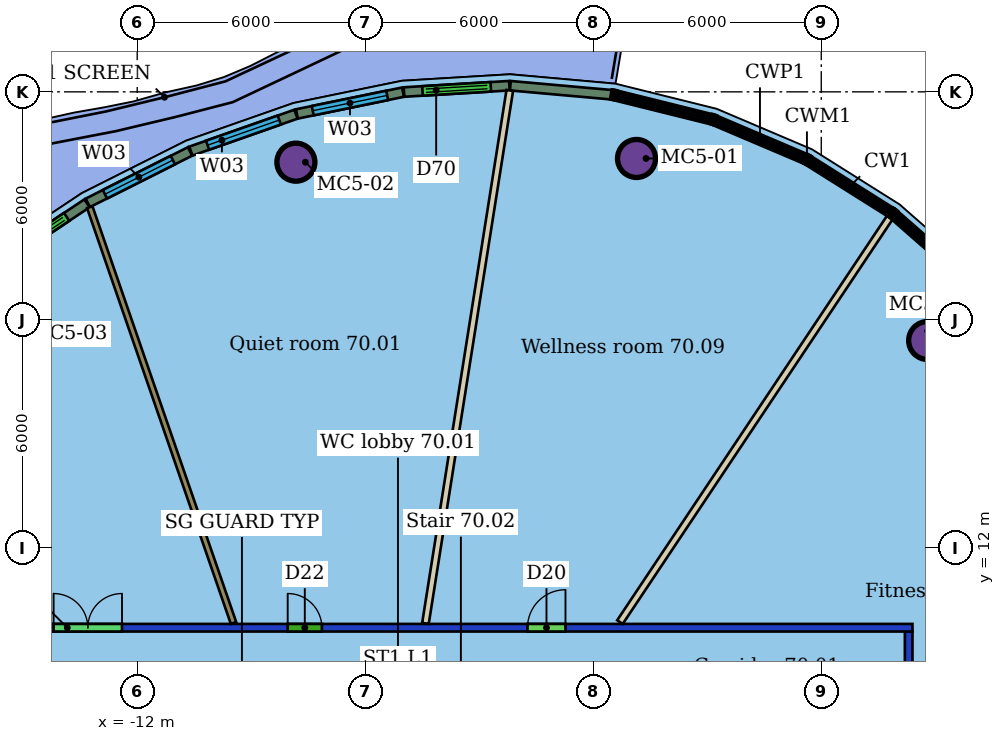
"""IFC4 building model, lengths in metres.
Left out: names, types, materials, properties, quantities, classifications, styles, units other than length and angle.
Written with IfcOpenShell. Run it as: python <this file> out.ifc"""

import sys

from ifc_helpers import new_model, si_unit, direction, frame, frame_2d, origin, origin_2d, place, context, subcontext, project, spatial, rectangle, hollow_circle, extrude, element, fill, save


model = new_model("IFC4")
c1 = context("Model", 3, precision=1e-05, world=origin(), true_north=direction((0.0, 1.0)))
c2 = subcontext(c1, "Body", "Model", "MODEL_VIEW")
j1 = project(units=[si_unit("LENGTHUNIT", "METRE"), si_unit("PLANEANGLEUNIT", "RADIAN")], contexts=[c1])
p1 = place(None, origin())
s1 = spatial("IfcSite", under=j1, at=p1, CompositionType="ELEMENT")
p2 = place(p1, origin())
s2 = spatial("IfcBuilding", under=s1, at=p2, CompositionType="ELEMENT")
p3 = place(p2, frame((0.0, 0.0, 282.9)))
s3 = spatial("IfcBuildingStorey", under=s2, at=p3, CompositionType="ELEMENT", Elevation=282.9)
for number, where, z_axis, x_axis in (
    (1, (1.138, 22.247, 0.0), (0.0, 0.0, 1.0), (1.0, 0.0, 0.0)),
    (2, (-7.825, 22.149, 0.0), (0.0, 0.0, 1.0), (1.0, 0.0, 0.0)),
    (3, (8.8, 17.457, 0.0), (0.0, 0.0, 1.0), (1.0, 0.0, 0.0)),
):
    element("IfcColumn", number, at=place(p3, frame(where, z_axis=z_axis, x_axis=x_axis)), inside=s3, PredefinedType="COLUMN", context=c2, shape_type="SweptSolid", body=[
        extrude(hollow_circle(Radius=0.5, WallThickness=0.04, at=origin_2d()), origin(), (0.0, 0.0, 1.0), 3.45),
    ])
p4 = place(p3, frame((-20.4, 9.9, 0.0), z_axis=(0.0, 0.0, 1.0), x_axis=(1.0, 0.0, 0.0)))
e4 = element("IfcWall", 4, at=p4, inside=s3, PredefinedType="PARTITIONING", context=c2, shape_type="SweptSolid", body=[
    extrude(rectangle(XDim=28.8, YDim=0.2, at=frame_2d((14.4, 0.0))), origin(), (0.0, 0.0, 1.0), 3.1),
])
p5 = place(p4, frame((12.36, 0.0, 0.0)))
e5 = element("IfcOpeningElement", 5, at=p5, cuts=e4, PredefinedType="OPENING", context=c2, shape_type="SweptSolid", body=[
    extrude(rectangle(XDim=0.9, YDim=2.1, at=frame_2d((0.45, 1.05))), frame((0.0, 0.11, 0.0), z_axis=(0.0, -1.0, 0.0), x_axis=(1.0, 0.0, 0.0)), (0.0, 0.0, 1.0), 0.22),
])
p6 = place(p4, frame((6.2, 0.0, 0.0)))
e6 = element("IfcOpeningElement", 6, at=p6, cuts=e4, PredefinedType="OPENING", context=c2, shape_type="SweptSolid", body=[
    extrude(rectangle(XDim=1.8, YDim=2.1, at=frame_2d((0.9, 1.05))), frame((0.0, 0.11, 0.0), z_axis=(0.0, -1.0, 0.0), x_axis=(1.0, 0.0, 0.0)), (0.0, 0.0, 1.0), 0.22),
])
p7 = place(p4, frame((18.669, 0.0, 0.0)))
e7 = element("IfcOpeningElement", 7, at=p7, cuts=e4, PredefinedType="OPENING", context=c2, shape_type="SweptSolid", body=[
    extrude(rectangle(XDim=1.0, YDim=2.1, at=frame_2d((0.5, 1.05))), frame((0.0, 0.11, 0.0), z_axis=(0.0, -1.0, 0.0), x_axis=(1.0, 0.0, 0.0)), (0.0, 0.0, 1.0), 0.22),
])
p8 = place(p3, frame((8.3, 9.8, 0.0), z_axis=(0.0, 0.0, 1.0), x_axis=(0.0, -1.0, 0.0)))
e8 = element("IfcWall", 8, at=p8, inside=s3, PredefinedType="PARTITIONING", context=c2, shape_type="SweptSolid", body=[
    extrude(rectangle(XDim=19.6, YDim=0.2, at=frame_2d((9.8, 0.0))), origin(), (0.0, 0.0, 1.0), 3.1),
])
p9 = place(p8, frame((14.189, 0.0, 0.0)))
e9 = element("IfcOpeningElement", 9, at=p9, cuts=e8, PredefinedType="OPENING", context=c2, shape_type="SweptSolid", body=[
    extrude(rectangle(XDim=1.5, YDim=2.1, at=frame_2d((0.75, 1.05))), frame((0.0, 0.11, 0.0), z_axis=(0.0, -1.0, 0.0), x_axis=(1.0, 0.0, 0.0)), (0.0, 0.0, 1.0), 0.22),
])
p10 = place(p8, frame((9.651, 0.0, 0.0)))
e10 = element("IfcOpeningElement", 10, at=p10, cuts=e8, PredefinedType="OPENING", context=c2, shape_type="SweptSolid", body=[
    extrude(rectangle(XDim=1.5, YDim=2.4, at=frame_2d((0.75, 1.2))), frame((0.0, 0.11, 0.0), z_axis=(0.0, -1.0, 0.0), x_axis=(1.0, 0.0, 0.0)), (0.0, 0.0, 1.0), 0.22),
])
p11 = place(p8, frame((4.201, 0.0, 0.0)))
e11 = element("IfcOpeningElement", 11, at=p11, cuts=e8, PredefinedType="OPENING", context=c2, shape_type="SweptSolid", body=[
    extrude(rectangle(XDim=1.5, YDim=2.1, at=frame_2d((0.75, 1.05))), frame((0.0, 0.11, 0.0), z_axis=(0.0, -1.0, 0.0), x_axis=(1.0, 0.0, 0.0)), (0.0, 0.0, 1.0), 0.22),
])
p12 = place(p3, frame((-2.196, 24.038, 0.0), z_axis=(0.0, 0.0, 1.0), x_axis=(-0.156301629097, -0.987709370585, 0.0)))
e12 = element("IfcWall", 12, at=p12, inside=s3, PredefinedType="PARTITIONING", context=c2, shape_type="SweptSolid", body=[
    extrude(rectangle(XDim=14.198, YDim=0.175, at=frame_2d((7.099, 0.0))), origin(), (0.0, 0.0, 1.0), 3.45),
])
p13 = place(p3, frame((-13.249, 20.965, 0.0), z_axis=(0.0, 0.0, 1.0), x_axis=(0.32678024546, -0.945100349792, 0.0)))
e13 = element("IfcWall", 13, at=p13, inside=s3, PredefinedType="PARTITIONING", context=c2, shape_type="SweptSolid", body=[
    extrude(rectangle(XDim=11.576, YDim=0.15, at=frame_2d((5.788, 0.0))), origin(), (0.0, 0.0, 1.0), 3.45),
])
p14 = place(p3, frame((7.807, 20.697, 0.0), z_axis=(0.0, 0.0, 1.0), x_axis=(-0.55495104707, -0.83188300581, 0.0)))
e14 = element("IfcWall", 14, at=p14, inside=s3, PredefinedType="PARTITIONING", context=c2, shape_type="SweptSolid", body=[
    extrude(rectangle(XDim=12.801, YDim=0.175, at=frame_2d((6.4, 0.0))), origin(), (0.0, 0.0, 1.0), 3.45),
])
p15 = place(p3, frame((0.482, 23.924, 0.0), z_axis=(0.0, 0.0, 1.0), x_axis=(-0.996046653752, 0.088831658488, 0.0)))
e15 = element("IfcWall", 15, at=p15, inside=s3, PredefinedType="SOLIDWALL", context=c2, shape_type="SweptSolid", body=[
    extrude(rectangle(XDim=2.674, YDim=0.25, at=frame_2d((1.337, 0.0))), origin(), (0.0, 0.0, 1.0), 3.15),
])
p16 = place(p3, frame((-2.208, 24.162, 0.0), z_axis=(0.0, 0.0, 1.0), x_axis=(-0.998195899902, -0.060041197678, 0.0)))
e16 = element("IfcWall", 16, at=p16, inside=s3, PredefinedType="SOLIDWALL", context=c2, shape_type="SweptSolid", body=[
    extrude(rectangle(XDim=2.777, YDim=0.25, at=frame_2d((1.389, 0.0))), origin(), (0.0, 0.0, 1.0), 3.15),
])
p17 = place(p16, frame((0.489, 0.0, 0.0)))
e17 = element("IfcOpeningElement", 17, at=p17, cuts=e16, PredefinedType="OPENING", context=c2, shape_type="SweptSolid", body=[
    extrude(rectangle(XDim=1.8, YDim=2.4, at=frame_2d((0.9, 1.2))), frame((0.0, 0.135, 0.0), z_axis=(0.0, -1.0, 0.0), x_axis=(1.0, 0.0, 0.0)), (0.0, 0.0, 1.0), 0.27),
])
p18 = place(p3, frame((-5.006, 23.992, 0.0), z_axis=(0.0, 0.0, 1.0), x_axis=(-0.979580220635, -0.201053702627, 0.0)))
e18 = element("IfcWall", 18, at=p18, inside=s3, PredefinedType="SOLIDWALL", context=c2, shape_type="SweptSolid", body=[
    extrude(rectangle(XDim=2.851, YDim=0.25, at=frame_2d((1.426, 0.0))), origin(), (0.0, 0.0, 1.0), 3.15),
])
p19 = place(p18, frame((0.426, 0.0, 0.9)))
e19 = element("IfcOpeningElement", 19, at=p19, cuts=e18, PredefinedType="OPENING", context=c2, shape_type="SweptSolid", body=[
    extrude(rectangle(XDim=2.0, YDim=2.1, at=frame_2d((1.0, 1.05))), frame((0.0, 0.135, 0.0), z_axis=(0.0, -1.0, 0.0), x_axis=(1.0, 0.0, 0.0)), (0.0, 0.0, 1.0), 0.27),
])
p20 = place(p3, frame((-7.823, 23.412, 0.0), z_axis=(0.0, 0.0, 1.0), x_axis=(-0.943550214261, -0.331229517355, 0.0)))
e20 = element("IfcWall", 20, at=p20, inside=s3, PredefinedType="SOLIDWALL", context=c2, shape_type="SweptSolid", body=[
    extrude(rectangle(XDim=2.931, YDim=0.25, at=frame_2d((1.466, 0.0))), origin(), (0.0, 0.0, 1.0), 3.15),
])
p21 = place(p20, frame((0.466, 0.0, 0.9)))
e21 = element("IfcOpeningElement", 21, at=p21, cuts=e20, PredefinedType="OPENING", context=c2, shape_type="SweptSolid", body=[
    extrude(rectangle(XDim=2.0, YDim=2.1, at=frame_2d((1.0, 1.05))), frame((0.0, 0.135, 0.0), z_axis=(0.0, -1.0, 0.0), x_axis=(1.0, 0.0, 0.0)), (0.0, 0.0, 1.0), 0.27),
])
p22 = place(p3, frame((-10.61, 22.432, 0.0), z_axis=(0.0, 0.0, 1.0), x_axis=(-0.893387281144, -0.449287397875, 0.0)))
e22 = element("IfcWall", 22, at=p22, inside=s3, PredefinedType="SOLIDWALL", context=c2, shape_type="SweptSolid", body=[
    extrude(rectangle(XDim=3.012, YDim=0.25, at=frame_2d((1.506, 0.0))), origin(), (0.0, 0.0, 1.0), 3.15),
])
p23 = place(p22, frame((0.506, 0.0, 0.9)))
e23 = element("IfcOpeningElement", 23, at=p23, cuts=e22, PredefinedType="OPENING", context=c2, shape_type="SweptSolid", body=[
    extrude(rectangle(XDim=2.0, YDim=2.1, at=frame_2d((1.0, 1.05))), frame((0.0, 0.135, 0.0), z_axis=(0.0, -1.0, 0.0), x_axis=(1.0, 0.0, 0.0)), (0.0, 0.0, 1.0), 0.27),
])
p24 = place(p3, frame((-13.321, 21.067, 0.0), z_axis=(0.0, 0.0, 1.0), x_axis=(-0.831965133189, -0.554827916707, 0.0)))
e24 = element("IfcWall", 24, at=p24, inside=s3, PredefinedType="SOLIDWALL", context=c2, shape_type="SweptSolid", body=[
    extrude(rectangle(XDim=3.088, YDim=0.25, at=frame_2d((1.544, 0.0))), origin(), (0.0, 0.0, 1.0), 3.15),
])
p25 = place(p24, frame((0.644, 0.0, 0.0)))
e25 = element("IfcOpeningElement", 25, at=p25, cuts=e24, PredefinedType="OPENING", context=c2, shape_type="SweptSolid", body=[
    extrude(rectangle(XDim=1.8, YDim=2.4, at=frame_2d((0.9, 1.2))), frame((0.0, 0.135, 0.0), z_axis=(0.0, -1.0, 0.0), x_axis=(1.0, 0.0, 0.0)), (0.0, 0.0, 1.0), 0.27),
])
p26 = place(p5, origin())
e26 = element("IfcDoor", 26, at=p26, inside=s3, OperationType="SINGLE_SWING_LEFT", PredefinedType="DOOR", context=c2, shape_type="SweptSolid", body=[
    extrude(rectangle(XDim=0.9, YDim=2.1, at=frame_2d((0.45, 1.05))), frame((0.0, 0.025, 0.0), z_axis=(0.0, -1.0, 0.0), x_axis=(1.0, 0.0, 0.0)), (0.0, 0.0, 1.0), 0.05),
])
fill(e5, e26)
p27 = place(p6, origin())
e27 = element("IfcDoor", 27, at=p27, inside=s3, OperationType="DOUBLE_DOOR_SINGLE_SWING", PredefinedType="DOOR", context=c2, shape_type="SweptSolid", body=[
    extrude(rectangle(XDim=1.8, YDim=2.1, at=frame_2d((0.9, 1.05))), frame((0.0, 0.025, 0.0), z_axis=(0.0, -1.0, 0.0), x_axis=(1.0, 0.0, 0.0)), (0.0, 0.0, 1.0), 0.05),
])
fill(e6, e27)
p28 = place(p7, origin())
e28 = element("IfcDoor", 28, at=p28, inside=s3, OperationType="SINGLE_SWING_RIGHT", PredefinedType="DOOR", context=c2, shape_type="SweptSolid", body=[
    extrude(rectangle(XDim=1.0, YDim=2.1, at=frame_2d((0.5, 1.05))), frame((0.0, 0.025, 0.0), z_axis=(0.0, -1.0, 0.0), x_axis=(1.0, 0.0, 0.0)), (0.0, 0.0, 1.0), 0.05),
])
fill(e7, e28)
p29 = place(p17, origin())
e29 = element("IfcDoor", 29, at=p29, inside=s3, OperationType="DOUBLE_DOOR_SLIDING", PredefinedType="DOOR", context=c2, shape_type="SweptSolid", body=[
    extrude(rectangle(XDim=1.8, YDim=2.4, at=frame_2d((0.9, 1.2))), frame((0.0, 0.025, 0.0), z_axis=(0.0, -1.0, 0.0), x_axis=(1.0, 0.0, 0.0)), (0.0, 0.0, 1.0), 0.05),
])
fill(e17, e29)
p30 = place(p19, origin())
e30 = element("IfcWindow", 30, at=p30, inside=s3, PartitioningType="SINGLE_PANEL", PredefinedType="WINDOW", context=c2, shape_type="SweptSolid", body=[
    extrude(rectangle(XDim=2.0, YDim=2.1, at=frame_2d((1.0, 1.05))), frame((0.0, 0.03, 0.0), z_axis=(0.0, -1.0, 0.0), x_axis=(1.0, 0.0, 0.0)), (0.0, 0.0, 1.0), 0.06),
])
fill(e19, e30)
p31 = place(p21, origin())
e31 = element("IfcWindow", 31, at=p31, inside=s3, PartitioningType="SINGLE_PANEL", PredefinedType="WINDOW", context=c2, shape_type="SweptSolid", body=[
    extrude(rectangle(XDim=2.0, YDim=2.1, at=frame_2d((1.0, 1.05))), frame((0.0, 0.03, 0.0), z_axis=(0.0, -1.0, 0.0), x_axis=(1.0, 0.0, 0.0)), (0.0, 0.0, 1.0), 0.06),
])
fill(e21, e31)
p32 = place(p23, origin())
e32 = element("IfcWindow", 32, at=p32, inside=s3, PartitioningType="SINGLE_PANEL", PredefinedType="WINDOW", context=c2, shape_type="SweptSolid", body=[
    extrude(rectangle(XDim=2.0, YDim=2.1, at=frame_2d((1.0, 1.05))), frame((0.0, 0.03, 0.0), z_axis=(0.0, -1.0, 0.0), x_axis=(1.0, 0.0, 0.0)), (0.0, 0.0, 1.0), 0.06),
])
fill(e23, e32)
p33 = place(p25, origin())
e33 = element("IfcDoor", 33, at=p33, inside=s3, OperationType="DOUBLE_DOOR_SLIDING", PredefinedType="DOOR", context=c2, shape_type="SweptSolid", body=[
    extrude(rectangle(XDim=1.8, YDim=2.4, at=frame_2d((0.9, 1.2))), frame((0.0, 0.025, 0.0), z_axis=(0.0, -1.0, 0.0), x_axis=(1.0, 0.0, 0.0)), (0.0, 0.0, 1.0), 0.05),
])
fill(e25, e33)
save(model, sys.argv[1])
